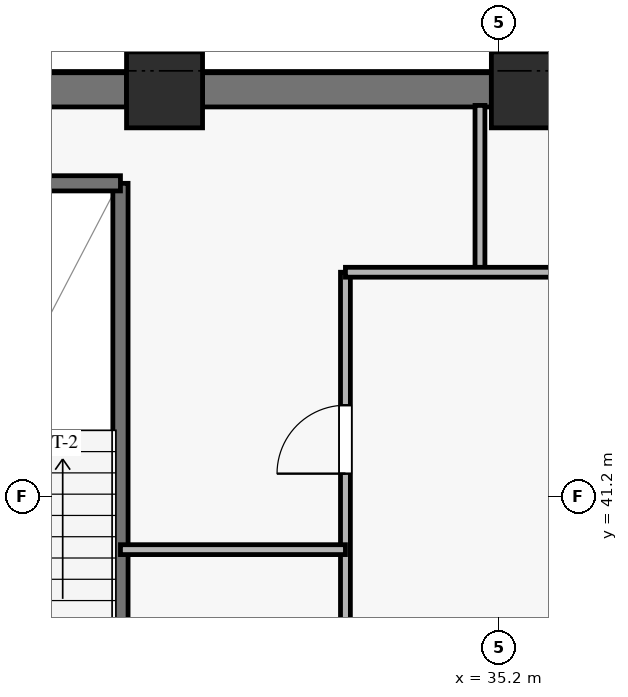
"""IFC4 building model, lengths in metres.
Left out: names, types, materials, properties, quantities, classifications, styles, units other than length and angle.
Written with IfcOpenShell. Run it as: python <this file> out.ifc"""

import sys

from ifc_helpers import new_model, si_unit, direction, frame, frame_2d, origin, origin_2d, place, context, subcontext, project, spatial, rectangle, extrude, source, transform, mapped, element, fill, save


model = new_model("IFC4")
c1 = context("Model", 3, precision=1e-05, world=origin(), true_north=direction((0.0, 1.0)))
c2 = subcontext(c1, "Body", "Model", "MODEL_VIEW")
j1 = project(units=[si_unit("LENGTHUNIT", "METRE"), si_unit("PLANEANGLEUNIT", "RADIAN")], contexts=[c1])
p1 = place(None, origin())
s1 = spatial("IfcSite", under=j1, at=p1, CompositionType="ELEMENT")
p2 = place(p1, origin())
s2 = spatial("IfcBuilding", under=s1, at=p2, CompositionType="ELEMENT")
p3 = place(p2, frame((0.0, 0.0, 241.7)))
s3 = spatial("IfcBuildingStorey", under=s2, at=p3, CompositionType="ELEMENT", Elevation=241.7)
m1 = source(origin(), c2, "Body", "SweptSolid", [
    extrude(rectangle(XDim=1.0, YDim=1.0, at=origin_2d()), origin(), (0.0, 0.0, 1.0), 3.185),
])
for number, where, z_axis, x_axis in (
    (1, (30.8, 46.55, 0.0), (0.0, 0.0, 1.0), (1.0, 0.0, 0.0)),
    (2, (35.6, 46.55, 0.0), (0.0, 0.0, 1.0), (1.0, 0.0, 0.0)),
):
    element("IfcColumn", number, at=place(p3, frame(where, z_axis=z_axis, x_axis=x_axis)), inside=s3, PredefinedType="PILASTER", context=c2, shape_type="MappedRepresentation", body=[
        mapped(m1, transform((0.0, 0.0, 0.0), x_axis=(1.0, 0.0, 0.0), y_axis=(0.0, 1.0, 0.0), z_axis=(0.0, 0.0, 1.0), scale=1.0)),
    ])
p4 = place(p3, frame((20.35, 46.55, 0.0), z_axis=(0.0, 0.0, 1.0), x_axis=(1.0, 0.0, 0.0)))
e3 = element("IfcWall", 3, at=p4, inside=s3, PredefinedType="SHEAR", context=c2, shape_type="SweptSolid", body=[
    extrude(rectangle(XDim=9.95, YDim=0.45, at=frame_2d((4.975, 0.0))), origin(), (0.0, 0.0, 1.0), 3.185),
])
p5 = place(p3, frame((31.3, 46.55, 0.0), z_axis=(0.0, 0.0, 1.0), x_axis=(1.0, 0.0, 0.0)))
e4 = element("IfcWall", 4, at=p5, inside=s3, PredefinedType="SHEAR", context=c2, shape_type="SweptSolid", body=[
    extrude(rectangle(XDim=3.8, YDim=0.45, at=frame_2d((1.9, 0.0))), origin(), (0.0, 0.0, 1.0), 3.185),
])
p6 = place(p3, frame((30.22, 38.07, 0.0), z_axis=(0.0, 0.0, 1.0), x_axis=(0.0, 1.0, 0.0)))
e5 = element("IfcWall", 5, at=p6, inside=s3, PredefinedType="SOLIDWALL", context=c2, shape_type="SweptSolid", body=[
    extrude(rectangle(XDim=7.25, YDim=0.2, at=frame_2d((3.625, 0.0))), origin(), (0.0, 0.0, 1.0), 3.4),
])
p7 = place(p3, frame((27.14, 45.32, 0.0), z_axis=(0.0, 0.0, 1.0), x_axis=(1.0, 0.0, 0.0)))
e6 = element("IfcWall", 6, at=p7, inside=s3, PredefinedType="SOLIDWALL", context=c2, shape_type="SweptSolid", body=[
    extrude(rectangle(XDim=3.08, YDim=0.2, at=frame_2d((1.54, 0.0))), origin(), (0.0, 0.0, 1.0), 3.4),
])
p8 = place(p3, frame((33.18, 37.655, 0.0), z_axis=(0.0, 0.0, 1.0), x_axis=(0.0, 1.0, 0.0)))
e7 = element("IfcWall", 7, at=p8, inside=s3, PredefinedType="PARTITIONING", context=c2, shape_type="SweptSolid", body=[
    extrude(rectangle(XDim=6.495, YDim=0.13, at=frame_2d((3.248, 0.0))), origin(), (0.0, 0.0, 1.0), 2.27),
])
p9 = place(p8, frame((0.945, 0.0, 0.0)))
e8 = element("IfcOpeningElement", 8, at=p9, cuts=e7, PredefinedType="OPENING", context=c2, shape_type="SweptSolid", body=[
    extrude(rectangle(XDim=0.9, YDim=2.1, at=frame_2d((0.45, 1.05))), frame((0.0, 0.075, 0.0), z_axis=(0.0, -1.0, 0.0), x_axis=(1.0, 0.0, 0.0)), (0.0, 0.0, 1.0), 0.15),
])
p10 = place(p8, frame((3.845, 0.0, 0.0)))
e9 = element("IfcOpeningElement", 9, at=p10, cuts=e7, PredefinedType="OPENING", context=c2, shape_type="SweptSolid", body=[
    extrude(rectangle(XDim=0.9, YDim=2.1, at=frame_2d((0.45, 1.05))), frame((0.0, 0.075, 0.0), z_axis=(0.0, -1.0, 0.0), x_axis=(1.0, 0.0, 0.0)), (0.0, 0.0, 1.0), 0.15),
])
p11 = place(p3, frame((34.95, 44.15, 0.0), z_axis=(0.0, 0.0, 1.0), x_axis=(0.0, 1.0, 0.0)))
e10 = element("IfcWall", 10, at=p11, inside=s3, PredefinedType="PARTITIONING", context=c2, shape_type="SweptSolid", body=[
    extrude(rectangle(XDim=2.195, YDim=0.13, at=frame_2d((1.098, 0.0))), origin(), (0.0, 0.0, 1.0), 3.185),
])
p12 = place(p3, frame((33.18, 44.15, 0.0), z_axis=(0.0, 0.0, 1.0), x_axis=(1.0, 0.0, 0.0)))
e11 = element("IfcWall", 11, at=p12, inside=s3, PredefinedType="PARTITIONING", context=c2, shape_type="SweptSolid", body=[
    extrude(rectangle(XDim=2.94, YDim=0.13, at=frame_2d((1.47, 0.0))), origin(), (0.0, 0.0, 1.0), 2.47),
])
p13 = place(p3, frame((30.22, 40.5, 0.0), z_axis=(0.0, 0.0, 1.0), x_axis=(1.0, 0.0, 0.0)))
e12 = element("IfcWall", 12, at=p13, inside=s3, PredefinedType="PARTITIONING", context=c2, shape_type="SweptSolid", body=[
    extrude(rectangle(XDim=2.96, YDim=0.13, at=frame_2d((1.48, 0.0))), origin(), (0.0, 0.0, 1.0), 2.47),
])
m2 = source(origin(), c2, "Body", "SweptSolid", [
    extrude(rectangle(XDim=0.9, YDim=2.1, at=frame_2d((0.45, 1.05))), frame((0.0, 0.025, 0.0), z_axis=(0.0, -1.0, 0.0), x_axis=(1.0, 0.0, 0.0)), (0.0, 0.0, 1.0), 0.05),
])
p14 = place(p10, origin())
e13 = element("IfcDoor", 13, at=p14, inside=s3, OperationType="SINGLE_SWING_LEFT", PredefinedType="DOOR", context=c2, shape_type="MappedRepresentation", body=[
    mapped(m2, transform((0.0, 0.0, 0.0), x_axis=(1.0, 0.0, 0.0), y_axis=(0.0, 1.0, 0.0), z_axis=(0.0, 0.0, 1.0), scale=1.0)),
])
fill(e9, e13)
save(model, sys.argv[1])
